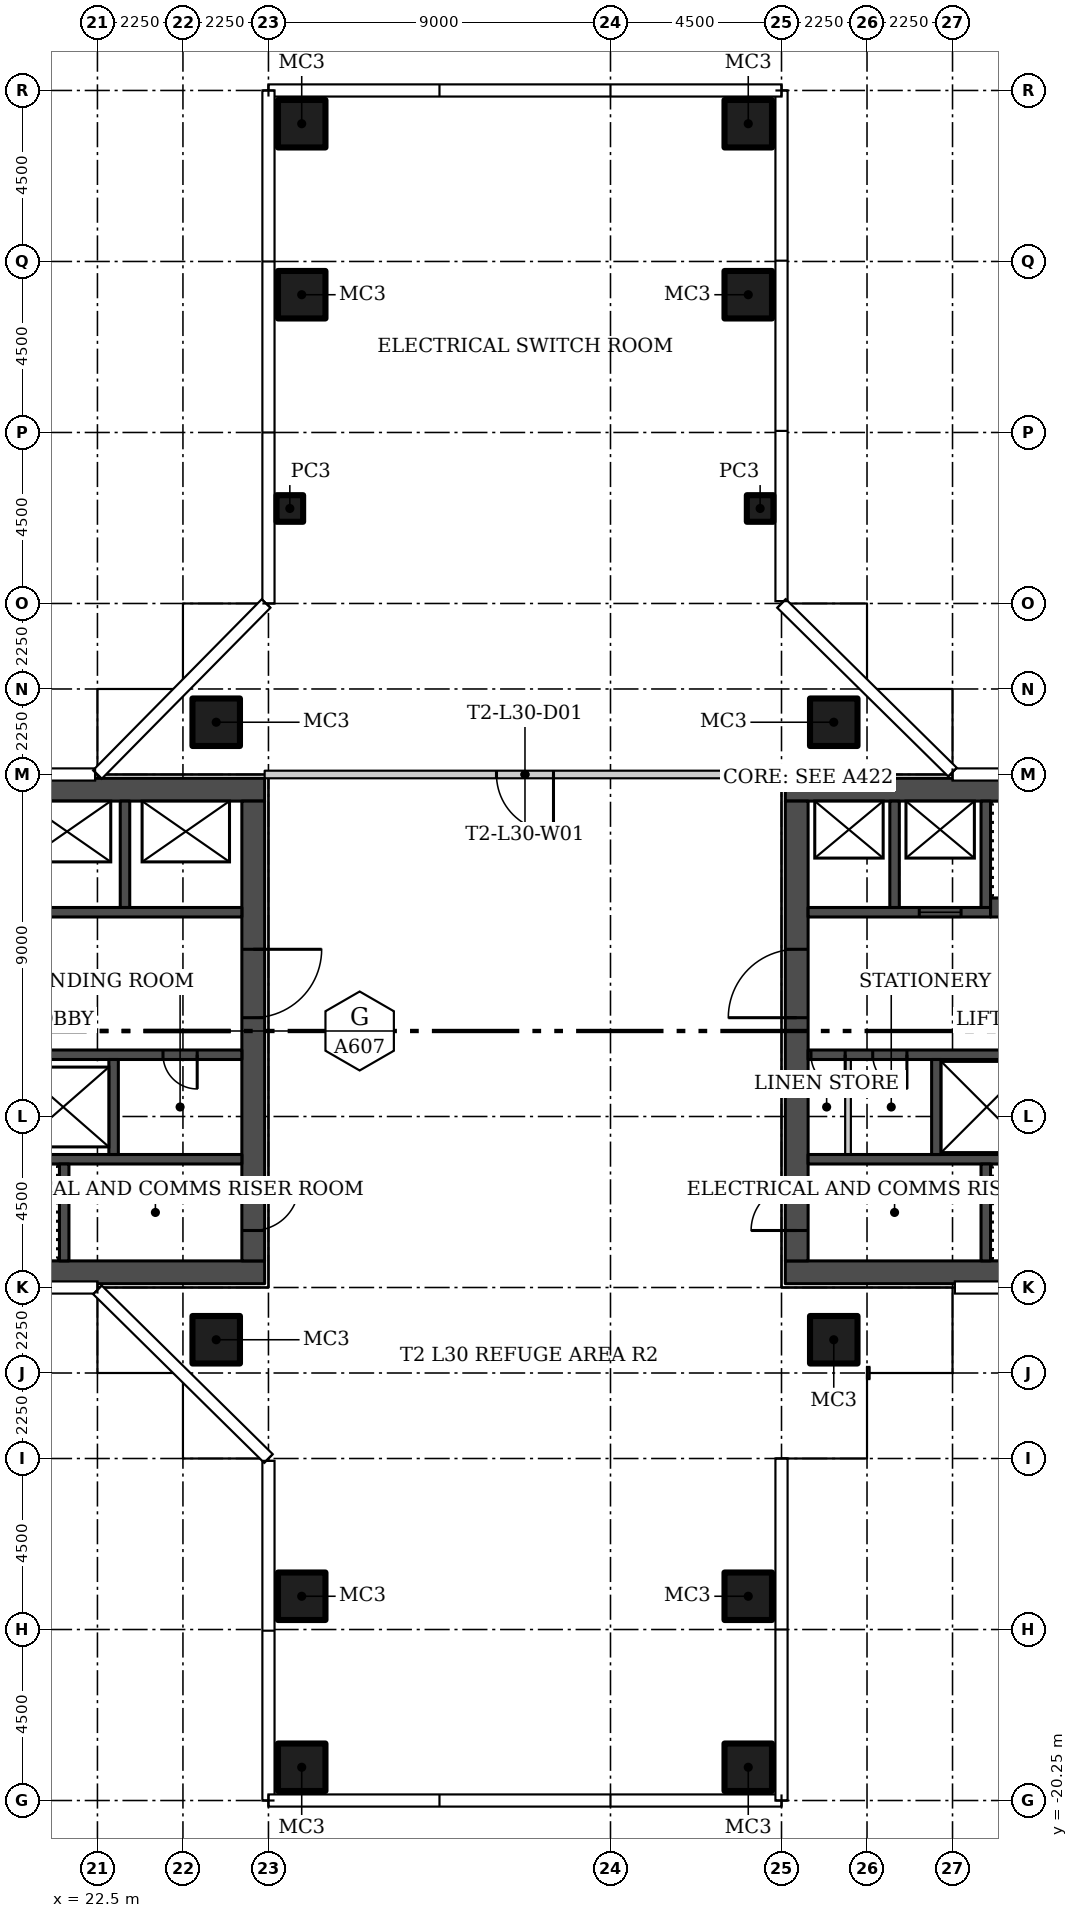
"""IFC4 building model, lengths in metres.
Left out: names, types, materials, properties, quantities, classifications, styles, units other than length and angle.
Written with IfcOpenShell. Run it as: python <this file> out.ifc"""

import sys

from ifc_helpers import new_model, si_unit, direction, frame, frame_2d, origin, origin_2d, place, context, subcontext, project, spatial, rectangle, hollow_rectangle, extrude, element, fill, save


model = new_model("IFC4")
c1 = context("Model", 3, precision=1e-05, world=origin(), true_north=direction((0.0, 1.0)))
c2 = subcontext(c1, "Body", "Model", "MODEL_VIEW")
j1 = project(units=[si_unit("LENGTHUNIT", "METRE"), si_unit("PLANEANGLEUNIT", "RADIAN")], contexts=[c1])
p1 = place(None, origin())
s1 = spatial("IfcSite", under=j1, at=p1, CompositionType="ELEMENT")
p2 = place(p1, origin())
s2 = spatial("IfcBuilding", under=s1, at=p2, CompositionType="ELEMENT")
p3 = place(p2, frame((0.0, 0.0, 128.7)))
s3 = spatial("IfcBuildingStorey", under=s2, at=p3, CompositionType="ELEMENT", Elevation=128.7)
for number, where in (
    (1, (25.625, 8.125, 0.0)),
    (2, (41.875, 8.125, 0.0)),
    (3, (25.625, -8.125, 0.0)),
    (4, (41.875, -8.125, 0.0)),
):
    element("IfcColumn", number, at=place(p3, frame(where)), inside=s3, PredefinedType="COLUMN", context=c2, shape_type="SweptSolid", body=[
        extrude(hollow_rectangle(XDim=1.25, YDim=1.25, WallThickness=0.05, at=origin_2d()), origin(), (0.0, 0.0, 1.0), 4.4),
    ])
p4 = place(p3, frame((39.938, 13.75, 0.0)))
e5 = element("IfcColumn", 5, at=p4, inside=s3, PredefinedType="COLUMN", context=c2, shape_type="SweptSolid", body=[
    extrude(hollow_rectangle(XDim=0.7, YDim=0.7, WallThickness=0.025, at=origin_2d()), origin(), (0.0, 0.0, 1.0), 4.4),
])
for number, where in (
    (6, (39.625, 19.375, 0.0)),
    (7, (39.625, 23.875, 0.0)),
):
    element("IfcColumn", number, at=place(p3, frame(where)), inside=s3, PredefinedType="COLUMN", context=c2, shape_type="SweptSolid", body=[
        extrude(hollow_rectangle(XDim=1.25, YDim=1.25, WallThickness=0.05, at=origin_2d()), origin(), (0.0, 0.0, 1.0), 4.4),
    ])
p5 = place(p3, frame((27.562, 13.75, 0.0)))
e8 = element("IfcColumn", 8, at=p5, inside=s3, PredefinedType="COLUMN", context=c2, shape_type="SweptSolid", body=[
    extrude(hollow_rectangle(XDim=0.7, YDim=0.7, WallThickness=0.025, at=origin_2d()), origin(), (0.0, 0.0, 1.0), 4.4),
])
for number, where in (
    (9, (27.875, 19.375, 0.0)),
    (10, (27.875, 23.875, 0.0)),
    (11, (39.625, -14.875, 0.0)),
    (12, (39.625, -19.375, 0.0)),
    (13, (27.875, -14.875, 0.0)),
    (14, (27.875, -19.375, 0.0)),
):
    element("IfcColumn", number, at=place(p3, frame(where)), inside=s3, PredefinedType="COLUMN", context=c2, shape_type="SweptSolid", body=[
        extrude(hollow_rectangle(XDim=1.25, YDim=1.25, WallThickness=0.05, at=origin_2d()), origin(), (0.0, 0.0, 1.0), 4.4),
    ])
p6 = place(p3, frame((40.6, 6.75, 0.0), z_axis=(0.0, 0.0, 1.0), x_axis=(-1.0, 0.0, 0.0)))
e15 = element("IfcWall", 15, at=p6, inside=s3, PredefinedType="PARTITIONING", context=c2, shape_type="SweptSolid", body=[
    extrude(rectangle(XDim=13.7, YDim=0.2, at=frame_2d((6.85, 0.0))), origin(), (0.0, 0.0, 1.0), 4.4),
])
p7 = place(p6, frame((6.1, 0.0, 0.0)))
e16 = element("IfcOpeningElement", 16, at=p7, cuts=e15, PredefinedType="OPENING", context=c2, shape_type="SweptSolid", body=[
    extrude(rectangle(XDim=1.5, YDim=2.4, at=frame_2d((0.75, 1.2))), frame((0.0, 0.11, 0.0), z_axis=(0.0, -1.0, 0.0), x_axis=(1.0, 0.0, 0.0)), (0.0, 0.0, 1.0), 0.22),
])
for number, where in (
    (17, (13.6, -6.35, 0.0)),
    (18, (13.6, 6.35, 0.0)),
):
    element("IfcWall", number, at=place(p3, frame(where)), inside=s3, PredefinedType="SHEAR", context=c2, shape_type="SweptSolid", body=[
        extrude(rectangle(XDim=13.3, YDim=0.6, at=frame_2d((6.65, 0.0))), origin(), (0.0, 0.0, 1.0), 4.4),
    ])
p8 = place(p3, frame((26.6, 6.05, 0.0), z_axis=(0.0, 0.0, 1.0), x_axis=(0.0, -1.0, 0.0)))
e19 = element("IfcWall", 19, at=p8, inside=s3, PredefinedType="SHEAR", context=c2, shape_type="SweptSolid", body=[
    extrude(rectangle(XDim=12.1, YDim=0.6, at=frame_2d((6.05, 0.0))), origin(), (0.0, 0.0, 1.0), 4.4),
])
p9 = place(p8, frame((10.1, 0.0, 0.0)))
e20 = element("IfcOpeningElement", 20, at=p9, cuts=e19, PredefinedType="OPENING", context=c2, shape_type="SweptSolid", body=[
    extrude(rectangle(XDim=1.2, YDim=2.1, at=frame_2d((0.6, 1.05))), frame((0.0, 0.31, 0.0), z_axis=(0.0, -1.0, 0.0), x_axis=(1.0, 0.0, 0.0)), (0.0, 0.0, 1.0), 0.62),
])
p10 = place(p8, frame((3.9, 0.0, 0.0)))
e21 = element("IfcOpeningElement", 21, at=p10, cuts=e19, PredefinedType="OPENING", context=c2, shape_type="SweptSolid", body=[
    extrude(rectangle(XDim=1.8, YDim=2.4, at=frame_2d((0.9, 1.2))), frame((0.0, 0.31, 0.0), z_axis=(0.0, -1.0, 0.0), x_axis=(1.0, 0.0, 0.0)), (0.0, 0.0, 1.0), 0.62),
])
p11 = place(p3, frame((26.3, -3.375, 0.0), z_axis=(0.0, 0.0, 1.0), x_axis=(-1.0, 0.0, 0.0)))
e22 = element("IfcWall", 22, at=p11, inside=s3, PredefinedType="SHEAR", context=c2, shape_type="SweptSolid", body=[
    extrude(rectangle(XDim=12.1, YDim=0.25, at=frame_2d((6.05, 0.0))), origin(), (0.0, 0.0, 1.0), 4.4),
])
p12 = place(p11, frame((10.95, 0.0, 0.0)))
e23 = element("IfcOpeningElement", 23, at=p12, cuts=e22, PredefinedType="OPENING", context=c2, shape_type="SweptSolid", body=[
    extrude(rectangle(XDim=1.1, YDim=2.1, at=frame_2d((0.55, 1.05))), frame((0.0, 0.135, 0.0), z_axis=(0.0, -1.0, 0.0), x_axis=(1.0, 0.0, 0.0)), (0.0, 0.0, 1.0), 0.27),
])
p13 = place(p3, frame((21.625, -6.05, 0.0), z_axis=(0.0, 0.0, 1.0), x_axis=(0.0, 1.0, 0.0)))
e24 = element("IfcWall", 24, at=p13, inside=s3, PredefinedType="SHEAR", context=c2, shape_type="SweptSolid", body=[
    extrude(rectangle(XDim=2.55, YDim=0.25, at=frame_2d((1.275, 0.0))), origin(), (0.0, 0.0, 1.0), 4.4),
])
p14 = place(p3, frame((26.3, -0.625, 0.0), z_axis=(0.0, 0.0, 1.0), x_axis=(-1.0, 0.0, 0.0)))
e25 = element("IfcWall", 25, at=p14, inside=s3, PredefinedType="SHEAR", context=c2, shape_type="SweptSolid", body=[
    extrude(rectangle(XDim=12.1, YDim=0.25, at=frame_2d((6.05, 0.0))), origin(), (0.0, 0.0, 1.0), 4.4),
])
p15 = place(p14, frame((8.65, 0.0, 0.0)))
e26 = element("IfcOpeningElement", 26, at=p15, cuts=e25, PredefinedType="OPENING", context=c2, shape_type="SweptSolid", body=[
    extrude(rectangle(XDim=1.2, YDim=2.1, at=frame_2d((0.6, 1.05))), frame((0.0, 0.135, 0.0), z_axis=(0.0, -1.0, 0.0), x_axis=(1.0, 0.0, 0.0)), (0.0, 0.0, 1.0), 0.27),
])
p16 = place(p14, frame((1.175, 0.0, 0.0)))
e27 = element("IfcOpeningElement", 27, at=p16, cuts=e25, PredefinedType="OPENING", context=c2, shape_type="SweptSolid", body=[
    extrude(rectangle(XDim=0.9, YDim=2.1, at=frame_2d((0.45, 1.05))), frame((0.0, 0.135, 0.0), z_axis=(0.0, -1.0, 0.0), x_axis=(1.0, 0.0, 0.0)), (0.0, 0.0, 1.0), 0.27),
])
p17 = place(p3, frame((22.925, -3.25, 0.0), z_axis=(0.0, 0.0, 1.0), x_axis=(0.0, 1.0, 0.0)))
e28 = element("IfcWall", 28, at=p17, inside=s3, PredefinedType="SHEAR", context=c2, shape_type="SweptSolid", body=[
    extrude(rectangle(XDim=2.5, YDim=0.25, at=frame_2d((1.25, 0.0))), origin(), (0.0, 0.0, 1.0), 4.4),
])
p18 = place(p3, frame((14.2, 3.125, 0.0)))
e29 = element("IfcWall", 29, at=p18, inside=s3, PredefinedType="SHEAR", context=c2, shape_type="SweptSolid", body=[
    extrude(rectangle(XDim=12.1, YDim=0.25, at=frame_2d((6.05, 0.0))), origin(), (0.0, 0.0, 1.0), 4.4),
])
p19 = place(p18, frame((0.85, 0.0, 0.0)))
e30 = element("IfcOpeningElement", 30, at=p19, cuts=e29, PredefinedType="OPENING", context=c2, shape_type="SweptSolid", body=[
    extrude(rectangle(XDim=1.1, YDim=2.1, at=frame_2d((0.55, 1.05))), frame((0.0, 0.135, 0.0), z_axis=(0.0, -1.0, 0.0), x_axis=(1.0, 0.0, 0.0)), (0.0, 0.0, 1.0), 0.27),
])
p20 = place(p18, frame((3.9, 0.0, 0.0)))
e31 = element("IfcOpeningElement", 31, at=p20, cuts=e29, PredefinedType="OPENING", context=c2, shape_type="SweptSolid", body=[
    extrude(rectangle(XDim=1.1, YDim=2.1, at=frame_2d((0.55, 1.05))), frame((0.0, 0.135, 0.0), z_axis=(0.0, -1.0, 0.0), x_axis=(1.0, 0.0, 0.0)), (0.0, 0.0, 1.0), 0.27),
])
p21 = place(p3, frame((23.225, 3.25, 0.0), z_axis=(0.0, 0.0, 1.0), x_axis=(0.0, 1.0, 0.0)))
e32 = element("IfcWall", 32, at=p21, inside=s3, PredefinedType="SHEAR", context=c2, shape_type="SweptSolid", body=[
    extrude(rectangle(XDim=2.8, YDim=0.25, at=frame_2d((1.4, 0.0))), origin(), (0.0, 0.0, 1.0), 4.4),
])
for number, where, z_axis, x_axis in (
    (33, (53.9, -6.35, 0.0), (0.0, 0.0, 1.0), (-1.0, 0.0, 0.0)),
    (34, (53.9, 6.35, 0.0), (0.0, 0.0, 1.0), (-1.0, 0.0, 0.0)),
):
    element("IfcWall", number, at=place(p3, frame(where, z_axis=z_axis, x_axis=x_axis)), inside=s3, PredefinedType="SHEAR", context=c2, shape_type="SweptSolid", body=[
        extrude(rectangle(XDim=13.3, YDim=0.6, at=frame_2d((6.65, 0.0))), origin(), (0.0, 0.0, 1.0), 4.4),
    ])
p22 = place(p3, frame((40.9, -6.05, 0.0), z_axis=(0.0, 0.0, 1.0), x_axis=(0.0, 1.0, 0.0)))
e35 = element("IfcWall", 35, at=p22, inside=s3, PredefinedType="SHEAR", context=c2, shape_type="SweptSolid", body=[
    extrude(rectangle(XDim=12.1, YDim=0.6, at=frame_2d((6.05, 0.0))), origin(), (0.0, 0.0, 1.0), 4.4),
])
p23 = place(p22, frame((0.8, 0.0, 0.0)))
e36 = element("IfcOpeningElement", 36, at=p23, cuts=e35, PredefinedType="OPENING", context=c2, shape_type="SweptSolid", body=[
    extrude(rectangle(XDim=1.2, YDim=2.1, at=frame_2d((0.6, 1.05))), frame((0.0, 0.31, 0.0), z_axis=(0.0, -1.0, 0.0), x_axis=(1.0, 0.0, 0.0)), (0.0, 0.0, 1.0), 0.62),
])
p24 = place(p22, frame((6.4, 0.0, 0.0)))
e37 = element("IfcOpeningElement", 37, at=p24, cuts=e35, PredefinedType="OPENING", context=c2, shape_type="SweptSolid", body=[
    extrude(rectangle(XDim=1.8, YDim=2.4, at=frame_2d((0.9, 1.2))), frame((0.0, 0.31, 0.0), z_axis=(0.0, -1.0, 0.0), x_axis=(1.0, 0.0, 0.0)), (0.0, 0.0, 1.0), 0.62),
])
p25 = place(p3, frame((53.3, -3.375, 0.0), z_axis=(0.0, 0.0, 1.0), x_axis=(-1.0, 0.0, 0.0)))
e38 = element("IfcWall", 38, at=p25, inside=s3, PredefinedType="SHEAR", context=c2, shape_type="SweptSolid", body=[
    extrude(rectangle(XDim=12.1, YDim=0.25, at=frame_2d((6.05, 0.0))), origin(), (0.0, 0.0, 1.0), 4.4),
])
p26 = place(p25, frame((0.05, 0.0, 0.0)))
e39 = element("IfcOpeningElement", 39, at=p26, cuts=e38, PredefinedType="OPENING", context=c2, shape_type="SweptSolid", body=[
    extrude(rectangle(XDim=1.1, YDim=2.1, at=frame_2d((0.55, 1.05))), frame((0.0, 0.135, 0.0), z_axis=(0.0, -1.0, 0.0), x_axis=(1.0, 0.0, 0.0)), (0.0, 0.0, 1.0), 0.27),
])
p27 = place(p3, frame((45.875, -6.05, 0.0), z_axis=(0.0, 0.0, 1.0), x_axis=(0.0, 1.0, 0.0)))
e40 = element("IfcWall", 40, at=p27, inside=s3, PredefinedType="SHEAR", context=c2, shape_type="SweptSolid", body=[
    extrude(rectangle(XDim=2.55, YDim=0.25, at=frame_2d((1.275, 0.0))), origin(), (0.0, 0.0, 1.0), 4.4),
])
p28 = place(p3, frame((53.3, -0.625, 0.0), z_axis=(0.0, 0.0, 1.0), x_axis=(-1.0, 0.0, 0.0)))
e41 = element("IfcWall", 41, at=p28, inside=s3, PredefinedType="SHEAR", context=c2, shape_type="SweptSolid", body=[
    extrude(rectangle(XDim=12.1, YDim=0.25, at=frame_2d((6.05, 0.0))), origin(), (0.0, 0.0, 1.0), 4.4),
])
p29 = place(p28, frame((2.25, 0.0, 0.0)))
e42 = element("IfcOpeningElement", 42, at=p29, cuts=e41, PredefinedType="OPENING", context=c2, shape_type="SweptSolid", body=[
    extrude(rectangle(XDim=1.2, YDim=2.1, at=frame_2d((0.6, 1.05))), frame((0.0, 0.135, 0.0), z_axis=(0.0, -1.0, 0.0), x_axis=(1.0, 0.0, 0.0)), (0.0, 0.0, 1.0), 0.27),
])
p30 = place(p28, frame((9.5, 0.0, 0.0)))
e43 = element("IfcOpeningElement", 43, at=p30, cuts=e41, PredefinedType="OPENING", context=c2, shape_type="SweptSolid", body=[
    extrude(rectangle(XDim=0.9, YDim=2.1, at=frame_2d((0.45, 1.05))), frame((0.0, 0.135, 0.0), z_axis=(0.0, -1.0, 0.0), x_axis=(1.0, 0.0, 0.0)), (0.0, 0.0, 1.0), 0.27),
])
p31 = place(p28, frame((11.125, 0.0, 0.0)))
e44 = element("IfcOpeningElement", 44, at=p31, cuts=e41, PredefinedType="OPENING", context=c2, shape_type="SweptSolid", body=[
    extrude(rectangle(XDim=0.9, YDim=2.1, at=frame_2d((0.45, 1.05))), frame((0.0, 0.135, 0.0), z_axis=(0.0, -1.0, 0.0), x_axis=(1.0, 0.0, 0.0)), (0.0, 0.0, 1.0), 0.27),
])
p32 = place(p3, frame((44.575, -3.25, 0.0), z_axis=(0.0, 0.0, 1.0), x_axis=(0.0, 1.0, 0.0)))
e45 = element("IfcWall", 45, at=p32, inside=s3, PredefinedType="SHEAR", context=c2, shape_type="SweptSolid", body=[
    extrude(rectangle(XDim=2.5, YDim=0.25, at=frame_2d((1.25, 0.0))), origin(), (0.0, 0.0, 1.0), 4.4),
])
p33 = place(p3, frame((42.25, -3.25, 0.0), z_axis=(0.0, 0.0, 1.0), x_axis=(0.0, 1.0, 0.0)))
e46 = element("IfcWall", 46, at=p33, inside=s3, PredefinedType="PARTITIONING", context=c2, shape_type="SweptSolid", body=[
    extrude(rectangle(XDim=2.5, YDim=0.15, at=frame_2d((1.25, 0.0))), origin(), (0.0, 0.0, 1.0), 4.4),
])
p34 = place(p3, frame((46.0, 3.25, 0.0)))
e47 = element("IfcWall", 47, at=p34, inside=s3, PredefinedType="SHEAR", context=c2, shape_type="SweptSolid", body=[
    extrude(rectangle(XDim=7.3, YDim=0.5, at=frame_2d((3.65, 0.0))), origin(), (0.0, 0.0, 1.0), 4.4),
])
p35 = place(p34, frame((6.15, 0.0, 0.0)))
e48 = element("IfcOpeningElement", 48, at=p35, cuts=e47, PredefinedType="OPENING", context=c2, shape_type="SweptSolid", body=[
    extrude(rectangle(XDim=1.1, YDim=2.1, at=frame_2d((0.55, 1.05))), frame((0.0, 0.26, 0.0), z_axis=(0.0, -1.0, 0.0), x_axis=(1.0, 0.0, 0.0)), (0.0, 0.0, 1.0), 0.52),
])
p36 = place(p3, frame((46.0, 3.125, 0.0), z_axis=(0.0, 0.0, 1.0), x_axis=(-1.0, 0.0, 0.0)))
e49 = element("IfcWall", 49, at=p36, inside=s3, PredefinedType="SHEAR", context=c2, shape_type="SweptSolid", body=[
    extrude(rectangle(XDim=4.8, YDim=0.25, at=frame_2d((2.4, 0.0))), origin(), (0.0, 0.0, 1.0), 4.4),
])
p37 = place(p36, frame((0.775, 0.0, 0.0)))
e50 = element("IfcOpeningElement", 50, at=p37, cuts=e49, PredefinedType="OPENING", context=c2, shape_type="SweptSolid", body=[
    extrude(rectangle(XDim=1.1, YDim=2.1, at=frame_2d((0.55, 1.05))), frame((0.0, 0.135, 0.0), z_axis=(0.0, -1.0, 0.0), x_axis=(1.0, 0.0, 0.0)), (0.0, 0.0, 1.0), 0.27),
])
for number, where, z_axis, x_axis in (
    (51, (45.875, 3.25, 0.0), (0.0, 0.0, 1.0), (0.0, 1.0, 0.0)),
    (52, (43.475, 3.25, 0.0), (0.0, 0.0, 1.0), (0.0, 1.0, 0.0)),
):
    element("IfcWall", number, at=place(p3, frame(where, z_axis=z_axis, x_axis=x_axis)), inside=s3, PredefinedType="SHEAR", context=c2, shape_type="SweptSolid", body=[
        extrude(rectangle(XDim=2.8, YDim=0.25, at=frame_2d((1.4, 0.0))), origin(), (0.0, 0.0, 1.0), 4.4),
    ])
p38 = place(p7, origin())
e53 = element("IfcDoor", 53, at=p38, inside=s3, OperationType="DOUBLE_DOOR_SINGLE_SWING", PredefinedType="DOOR", context=c2, shape_type="SweptSolid", body=[
    extrude(rectangle(XDim=1.5, YDim=2.4, at=frame_2d((0.75, 1.2))), frame((0.0, 0.025, 0.0), z_axis=(0.0, -1.0, 0.0), x_axis=(1.0, 0.0, 0.0)), (0.0, 0.0, 1.0), 0.05),
])
fill(e16, e53)
p39 = place(p9, origin())
e54 = element("IfcDoor", 54, at=p39, inside=s3, OperationType="SINGLE_SWING_RIGHT", PredefinedType="DOOR", context=c2, shape_type="SweptSolid", body=[
    extrude(rectangle(XDim=1.2, YDim=2.1, at=frame_2d((0.6, 1.05))), frame((0.0, 0.025, 0.0), z_axis=(0.0, -1.0, 0.0), x_axis=(1.0, 0.0, 0.0)), (0.0, 0.0, 1.0), 0.05),
])
fill(e20, e54)
p40 = place(p10, origin())
e55 = element("IfcDoor", 55, at=p40, inside=s3, OperationType="DOUBLE_DOOR_SINGLE_SWING", PredefinedType="DOOR", context=c2, shape_type="SweptSolid", body=[
    extrude(rectangle(XDim=1.8, YDim=2.4, at=frame_2d((0.9, 1.2))), frame((0.0, 0.025, 0.0), z_axis=(0.0, -1.0, 0.0), x_axis=(1.0, 0.0, 0.0)), (0.0, 0.0, 1.0), 0.05),
])
fill(e21, e55)
p41 = place(p16, origin())
e56 = element("IfcDoor", 56, at=p41, inside=s3, OperationType="SINGLE_SWING_LEFT", PredefinedType="DOOR", context=c2, shape_type="SweptSolid", body=[
    extrude(rectangle(XDim=0.9, YDim=2.1, at=frame_2d((0.45, 1.05))), frame((0.0, 0.025, 0.0), z_axis=(0.0, -1.0, 0.0), x_axis=(1.0, 0.0, 0.0)), (0.0, 0.0, 1.0), 0.05),
])
fill(e27, e56)
p42 = place(p23, origin())
e57 = element("IfcDoor", 57, at=p42, inside=s3, OperationType="SINGLE_SWING_LEFT", PredefinedType="DOOR", context=c2, shape_type="SweptSolid", body=[
    extrude(rectangle(XDim=1.2, YDim=2.1, at=frame_2d((0.6, 1.05))), frame((0.0, 0.025, 0.0), z_axis=(0.0, -1.0, 0.0), x_axis=(1.0, 0.0, 0.0)), (0.0, 0.0, 1.0), 0.05),
])
fill(e36, e57)
p43 = place(p24, origin())
e58 = element("IfcDoor", 58, at=p43, inside=s3, OperationType="DOUBLE_DOOR_SINGLE_SWING", PredefinedType="DOOR", context=c2, shape_type="SweptSolid", body=[
    extrude(rectangle(XDim=1.8, YDim=2.4, at=frame_2d((0.9, 1.2))), frame((0.0, 0.025, 0.0), z_axis=(0.0, -1.0, 0.0), x_axis=(1.0, 0.0, 0.0)), (0.0, 0.0, 1.0), 0.05),
])
fill(e37, e58)
p44 = place(p30, origin())
e59 = element("IfcDoor", 59, at=p44, inside=s3, OperationType="SINGLE_SWING_RIGHT", PredefinedType="DOOR", context=c2, shape_type="SweptSolid", body=[
    extrude(rectangle(XDim=0.9, YDim=2.1, at=frame_2d((0.45, 1.05))), frame((0.0, 0.025, 0.0), z_axis=(0.0, -1.0, 0.0), x_axis=(1.0, 0.0, 0.0)), (0.0, 0.0, 1.0), 0.05),
])
fill(e43, e59)
p45 = place(p31, origin())
e60 = element("IfcDoor", 60, at=p45, inside=s3, OperationType="SINGLE_SWING_RIGHT", PredefinedType="DOOR", context=c2, shape_type="SweptSolid", body=[
    extrude(rectangle(XDim=0.9, YDim=2.1, at=frame_2d((0.45, 1.05))), frame((0.0, 0.025, 0.0), z_axis=(0.0, -1.0, 0.0), x_axis=(1.0, 0.0, 0.0)), (0.0, 0.0, 1.0), 0.05),
])
fill(e44, e60)
p46 = place(p37, origin())
e61 = element("IfcDoor", 61, at=p46, inside=s3, OperationType="SLIDING_TO_LEFT", PredefinedType="DOOR", context=c2, shape_type="SweptSolid", body=[
    extrude(rectangle(XDim=1.1, YDim=2.1, at=frame_2d((0.55, 1.05))), frame((0.0, 0.025, 0.0), z_axis=(0.0, -1.0, 0.0), x_axis=(1.0, 0.0, 0.0)), (0.0, 0.0, 1.0), 0.05),
])
fill(e50, e61)
save(model, sys.argv[1])
